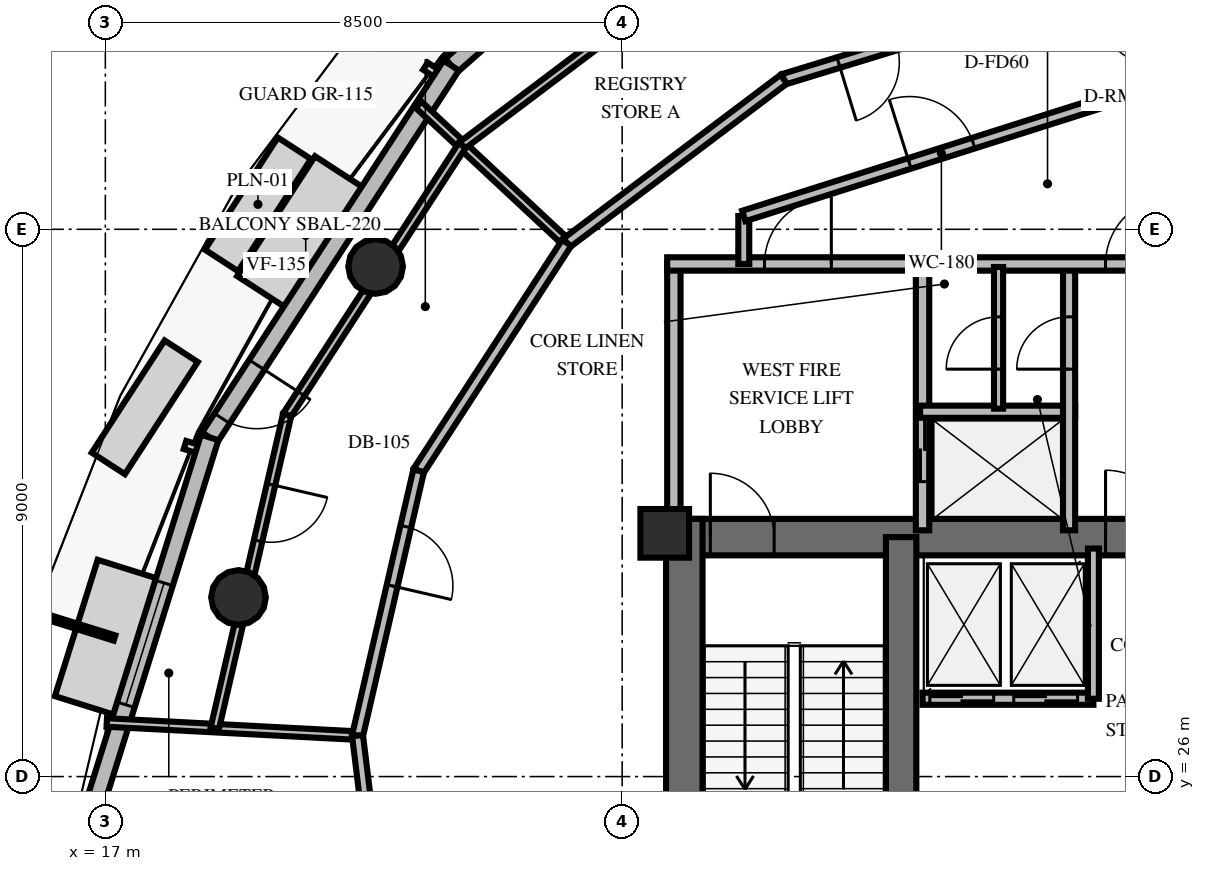
"""IFC4 building model, lengths in metres.
Left out: names, types, materials, properties, quantities, classifications, styles, units other than length and angle.
Written with IfcOpenShell. Run it as: python <this file> out.ifc"""

import sys

from ifc_helpers import new_model, si_unit, direction, frame, frame_2d, origin, origin_2d, place, context, subcontext, project, spatial, rectangle, circle, extrude, element, fill, save


model = new_model("IFC4")
c1 = context("Model", 3, precision=1e-05, world=origin(), true_north=direction((0.0, 1.0)))
c2 = subcontext(c1, "Body", "Model", "MODEL_VIEW")
j1 = project(units=[si_unit("LENGTHUNIT", "METRE"), si_unit("PLANEANGLEUNIT", "RADIAN")], contexts=[c1])
p1 = place(None, origin())
s1 = spatial("IfcSite", under=j1, at=p1, CompositionType="ELEMENT")
p2 = place(p1, origin())
s2 = spatial("IfcBuilding", under=s1, at=p2, CompositionType="ELEMENT")
p3 = place(p2, frame((0.0, 0.0, 266.4)))
s3 = spatial("IfcBuildingStorey", under=s2, at=p3, CompositionType="ELEMENT", Elevation=266.4)
p4 = place(p3, frame((26.222, 29.938, 0.0), z_axis=(0.0, 0.0, 1.0), x_axis=(1.0, 0.0, 0.0)))
e1 = element("IfcWall", 1, at=p4, inside=s3, PredefinedType="SHEAR", context=c2, shape_type="SweptSolid", body=[
    extrude(rectangle(XDim=15.566, YDim=0.6, at=frame_2d((7.783, 0.0))), origin(), (0.0, 0.0, 1.0), 3.6),
])
p5 = place(p4, frame((0.728, 0.0, 0.0)))
e2 = element("IfcOpeningElement", 2, at=p5, cuts=e1, PredefinedType="OPENING", context=c2, shape_type="SweptSolid", body=[
    extrude(rectangle(XDim=1.05, YDim=2.15, at=frame_2d((0.525, 1.075))), frame((0.0, 0.31, 0.0), z_axis=(0.0, -1.0, 0.0), x_axis=(1.0, 0.0, 0.0)), (0.0, 0.0, 1.0), 0.62),
])
p6 = place(p4, frame((13.778, 0.0, 0.0)))
e3 = element("IfcOpeningElement", 3, at=p6, cuts=e1, PredefinedType="OPENING", context=c2, shape_type="SweptSolid", body=[
    extrude(rectangle(XDim=1.05, YDim=2.15, at=frame_2d((0.525, 1.075))), frame((0.0, 0.31, 0.0), z_axis=(0.0, -1.0, 0.0), x_axis=(1.0, 0.0, 0.0)), (0.0, 0.0, 1.0), 0.62),
])
p7 = place(p4, frame((7.228, 0.0, 0.0)))
e4 = element("IfcOpeningElement", 4, at=p7, cuts=e1, PredefinedType="OPENING", context=c2, shape_type="SweptSolid", body=[
    extrude(rectangle(XDim=1.1, YDim=2.15, at=frame_2d((0.55, 1.075))), frame((0.0, 0.31, 0.0), z_axis=(0.0, -1.0, 0.0), x_axis=(1.0, 0.0, 0.0)), (0.0, 0.0, 1.0), 0.62),
])
p8 = place(p3, frame((26.522, 19.962, 0.0), z_axis=(0.0, 0.0, 1.0), x_axis=(0.0, 1.0, 0.0)))
e5 = element("IfcWall", 5, at=p8, inside=s3, PredefinedType="SHEAR", context=c2, shape_type="SweptSolid", body=[
    extrude(rectangle(XDim=10.276, YDim=0.6, at=frame_2d((5.138, 0.0))), origin(), (0.0, 0.0, 1.0), 3.6),
])
p9 = place(p3, frame((30.088, 20.262, 0.0), z_axis=(0.0, 0.0, 1.0), x_axis=(0.0, 1.0, 0.0)))
e6 = element("IfcWall", 6, at=p9, inside=s3, PredefinedType="SHEAR", context=c2, shape_type="SweptSolid", body=[
    extrude(rectangle(XDim=9.676, YDim=0.5, at=frame_2d((4.838, 0.0))), origin(), (0.0, 0.0, 1.0), 3.6),
])
p10 = place(p3, frame((26.2, 30.0, 0.0), z_axis=(0.0, 0.0, 1.0), x_axis=(1.0, 0.0, 0.0)))
e7 = element("IfcColumn", 7, at=p10, inside=s3, PredefinedType="PILASTER", context=c2, shape_type="SweptSolid", body=[
    extrude(rectangle(XDim=0.8, YDim=0.8, at=origin_2d()), origin(), (0.0, 0.0, 1.0), 3.6),
])
for number, where, z_axis, x_axis in (
    (8, (21.445, 34.389, 0.0), (0.0, 0.0, 1.0), (1.0, 0.0, 0.0)),
    (9, (19.19, 28.946, 0.0), (0.0, 0.0, 1.0), (1.0, 0.0, 0.0)),
):
    element("IfcColumn", number, at=place(p3, frame(where, z_axis=z_axis, x_axis=x_axis)), inside=s3, PredefinedType="COLUMN", context=c2, shape_type="SweptSolid", body=[
        extrude(circle(Radius=0.45, at=origin_2d()), origin(), (0.0, 0.0, 1.0), 3.6),
    ])
p11 = place(p3, frame((28.025, 42.4, 0.0), z_axis=(0.0, 0.0, 1.0), x_axis=(-0.750016069433, -0.661419606295, 0.0)))
e10 = element("IfcWall", 10, at=p11, inside=s3, PredefinedType="SOLIDWALL", context=c2, shape_type="SweptSolid", body=[
    extrude(rectangle(XDim=7.115, YDim=0.3, at=frame_2d((3.558, 0.0))), origin(), (0.0, 0.0, 1.0), 2.76),
])
p12 = place(p11, frame((2.508, 0.0, 0.8)))
e11 = element("IfcOpeningElement", 11, at=p12, cuts=e10, PredefinedType="OPENING", context=c2, shape_type="SweptSolid", body=[
    extrude(rectangle(XDim=2.1, YDim=1.85, at=frame_2d((1.05, 0.925))), frame((0.0, 0.16, 0.0), z_axis=(0.0, -1.0, 0.0), x_axis=(1.0, 0.0, 0.0)), (0.0, 0.0, 1.0), 0.32),
])
p13 = place(p3, frame((22.689, 37.694, 0.0), z_axis=(0.0, 0.0, 1.0), x_axis=(-0.544632964152, -0.838674510379, 0.0)))
e12 = element("IfcWall", 12, at=p13, inside=s3, PredefinedType="SOLIDWALL", context=c2, shape_type="SweptSolid", body=[
    extrude(rectangle(XDim=7.293, YDim=0.3, at=frame_2d((3.646, 0.0))), origin(), (0.0, 0.0, 1.0), 2.76),
])
p14 = place(p13, frame((5.87, 0.0, 0.0)))
e13 = element("IfcOpeningElement", 13, at=p14, cuts=e12, PredefinedType="OPENING", context=c2, shape_type="SweptSolid", body=[
    extrude(rectangle(XDim=1.05, YDim=2.15, at=frame_2d((0.525, 1.075))), frame((0.0, 0.16, 0.0), z_axis=(0.0, -1.0, 0.0), x_axis=(1.0, 0.0, 0.0)), (0.0, 0.0, 1.0), 0.32),
])
p15 = place(p3, frame((18.717, 31.577, 0.0), z_axis=(0.0, 0.0, 1.0), x_axis=(-0.299202870459, -0.954189521169, 0.0)))
e14 = element("IfcWall", 14, at=p15, inside=s3, PredefinedType="SOLIDWALL", context=c2, shape_type="SweptSolid", body=[
    extrude(rectangle(XDim=7.115, YDim=0.3, at=frame_2d((3.558, 0.0))), origin(), (0.0, 0.0, 1.0), 2.76),
])
p16 = place(p15, frame((2.508, 0.0, 0.8)))
e15 = element("IfcOpeningElement", 15, at=p16, cuts=e14, PredefinedType="OPENING", context=c2, shape_type="SweptSolid", body=[
    extrude(rectangle(XDim=2.1, YDim=1.85, at=frame_2d((1.05, 0.925))), frame((0.0, 0.16, 0.0), z_axis=(0.0, -1.0, 0.0), x_axis=(1.0, 0.0, 0.0)), (0.0, 0.0, 1.0), 0.32),
])
p17 = place(p3, frame((26.35, 30.05, 0.0), z_axis=(0.0, 0.0, 1.0), x_axis=(0.0, 1.0, 0.0)))
e16 = element("IfcWall", 16, at=p17, inside=s3, PredefinedType="SOLIDWALL", context=c2, shape_type="SweptSolid", body=[
    extrude(rectangle(XDim=4.38, YDim=0.22, at=frame_2d((2.19, 0.0))), origin(), (0.0, 0.0, 1.0), 2.46),
])
p18 = place(p3, frame((30.44, 30.05, 0.0), z_axis=(0.0, 0.0, 1.0), x_axis=(0.0, 1.0, 0.0)))
e17 = element("IfcWall", 17, at=p18, inside=s3, PredefinedType="SOLIDWALL", context=c2, shape_type="SweptSolid", body=[
    extrude(rectangle(XDim=4.38, YDim=0.22, at=frame_2d((2.19, 0.0))), origin(), (0.0, 0.0, 1.0), 2.46),
])
p19 = place(p18, frame((0.8, 0.0, 0.0)))
e18 = element("IfcOpeningElement", 18, at=p19, cuts=e17, PredefinedType="OPENING", context=c2, shape_type="SweptSolid", body=[
    extrude(rectangle(XDim=1.05, YDim=2.1, at=frame_2d((0.525, 1.05))), frame((0.0, 0.12, 0.0), z_axis=(0.0, -1.0, 0.0), x_axis=(1.0, 0.0, 0.0)), (0.0, 0.0, 1.0), 0.24),
])
p20 = place(p3, frame((26.24, 34.43, 0.0), z_axis=(0.0, 0.0, 1.0), x_axis=(1.0, 0.0, 0.0)))
e19 = element("IfcWall", 19, at=p20, inside=s3, PredefinedType="SOLIDWALL", context=c2, shape_type="SweptSolid", body=[
    extrude(rectangle(XDim=4.31, YDim=0.22, at=frame_2d((2.155, 0.0))), origin(), (0.0, 0.0, 1.0), 2.46),
])
p21 = place(p20, frame((1.6, 0.0, 0.0)))
e20 = element("IfcOpeningElement", 20, at=p21, cuts=e19, PredefinedType="OPENING", context=c2, shape_type="SweptSolid", body=[
    extrude(rectangle(XDim=1.1, YDim=2.15, at=frame_2d((0.55, 1.075))), frame((0.0, 0.12, 0.0), z_axis=(0.0, -1.0, 0.0), x_axis=(1.0, 0.0, 0.0)), (0.0, 0.0, 1.0), 0.24),
])
p22 = place(p3, frame((30.4, 32.0, 0.0), z_axis=(0.0, 0.0, 1.0), x_axis=(1.0, 0.0, 0.0)))
e21 = element("IfcWall", 21, at=p22, inside=s3, PredefinedType="SOLIDWALL", context=c2, shape_type="SweptSolid", body=[
    extrude(rectangle(XDim=2.55, YDim=0.2, at=frame_2d((1.275, 0.0))), origin(), (0.0, 0.0, 1.0), 2.46),
])
p23 = place(p3, frame((32.85, 30.05, 0.0), z_axis=(0.0, 0.0, 1.0), x_axis=(0.0, 1.0, 0.0)))
e22 = element("IfcWall", 22, at=p23, inside=s3, PredefinedType="SOLIDWALL", context=c2, shape_type="SweptSolid", body=[
    extrude(rectangle(XDim=4.38, YDim=0.2, at=frame_2d((2.19, 0.0))), origin(), (0.0, 0.0, 1.0), 2.46),
])
p24 = place(p23, frame((2.65, 0.0, 0.0)))
e23 = element("IfcOpeningElement", 23, at=p24, cuts=e22, PredefinedType="OPENING", context=c2, shape_type="SweptSolid", body=[
    extrude(rectangle(XDim=0.86, YDim=2.05, at=frame_2d((0.43, 1.025))), frame((0.0, 0.11, 0.0), z_axis=(0.0, -1.0, 0.0), x_axis=(1.0, 0.0, 0.0)), (0.0, 0.0, 1.0), 0.22),
])
p25 = place(p3, frame((30.44, 34.43, 0.0), z_axis=(0.0, 0.0, 1.0), x_axis=(1.0, 0.0, 0.0)))
e24 = element("IfcWall", 24, at=p25, inside=s3, PredefinedType="SOLIDWALL", context=c2, shape_type="SweptSolid", body=[
    extrude(rectangle(XDim=7.12, YDim=0.22, at=frame_2d((3.56, 0.0))), origin(), (0.0, 0.0, 1.0), 2.46),
])
p26 = place(p25, frame((3.01, 0.0, 0.0)))
e25 = element("IfcOpeningElement", 25, at=p26, cuts=e24, PredefinedType="OPENING", context=c2, shape_type="SweptSolid", body=[
    extrude(rectangle(XDim=1.1, YDim=2.15, at=frame_2d((0.55, 1.075))), frame((0.0, 0.12, 0.0), z_axis=(0.0, -1.0, 0.0), x_axis=(1.0, 0.0, 0.0)), (0.0, 0.0, 1.0), 0.24),
])
p27 = place(p3, frame((31.69, 32.05, 0.0), z_axis=(0.0, 0.0, 1.0), x_axis=(0.0, 1.0, 0.0)))
e26 = element("IfcWall", 26, at=p27, inside=s3, PredefinedType="PARTITIONING", context=c2, shape_type="SweptSolid", body=[
    extrude(rectangle(XDim=2.33, YDim=0.15, at=frame_2d((1.165, 0.0))), origin(), (0.0, 0.0, 1.0), 2.46),
])
p28 = place(p27, frame((0.65, 0.0, 0.0)))
e27 = element("IfcOpeningElement", 27, at=p28, cuts=e26, PredefinedType="OPENING", context=c2, shape_type="SweptSolid", body=[
    extrude(rectangle(XDim=0.86, YDim=2.05, at=frame_2d((0.43, 1.025))), frame((0.0, 0.085, 0.0), z_axis=(0.0, -1.0, 0.0), x_axis=(1.0, 0.0, 0.0)), (0.0, 0.0, 1.0), 0.17),
])
p29 = place(p3, frame((30.44, 27.28, 0.0), z_axis=(0.0, 0.0, 1.0), x_axis=(1.0, 0.0, 0.0)))
e28 = element("IfcWall", 28, at=p29, inside=s3, PredefinedType="SOLIDWALL", context=c2, shape_type="SweptSolid", body=[
    extrude(rectangle(XDim=2.81, YDim=0.2, at=frame_2d((1.405, 0.0))), origin(), (0.0, 0.0, 1.0), 2.46),
])
p30 = place(p29, frame((0.12, 0.0, 0.0)))
e29 = element("IfcOpeningElement", 29, at=p30, cuts=e28, PredefinedType="OPENING", context=c2, shape_type="SweptSolid", body=[
    extrude(rectangle(XDim=1.05, YDim=2.1, at=frame_2d((0.525, 1.05))), frame((0.0, 0.11, 0.0), z_axis=(0.0, -1.0, 0.0), x_axis=(1.0, 0.0, 0.0)), (0.0, 0.0, 1.0), 0.22),
])
p31 = place(p29, frame((1.5, 0.0, 0.0)))
e30 = element("IfcOpeningElement", 30, at=p31, cuts=e28, PredefinedType="OPENING", context=c2, shape_type="SweptSolid", body=[
    extrude(rectangle(XDim=1.05, YDim=2.1, at=frame_2d((0.525, 1.05))), frame((0.0, 0.11, 0.0), z_axis=(0.0, -1.0, 0.0), x_axis=(1.0, 0.0, 0.0)), (0.0, 0.0, 1.0), 0.22),
])
p32 = place(p3, frame((33.25, 27.28, 0.0), z_axis=(0.0, 0.0, 1.0), x_axis=(0.0, 1.0, 0.0)))
e31 = element("IfcWall", 31, at=p32, inside=s3, PredefinedType="SOLIDWALL", context=c2, shape_type="SweptSolid", body=[
    extrude(rectangle(XDim=2.47, YDim=0.18, at=frame_2d((1.235, 0.0))), origin(), (0.0, 0.0, 1.0), 2.46),
])
p33 = place(p3, frame((27.5, 34.43, 0.0), z_axis=(0.0, 0.0, 1.0), x_axis=(0.0, 1.0, 0.0)))
e32 = element("IfcWall", 32, at=p33, inside=s3, PredefinedType="PARTITIONING", context=c2, shape_type="SweptSolid", body=[
    extrude(rectangle(XDim=0.789, YDim=0.18, at=frame_2d((0.395, 0.0))), origin(), (0.0, 0.0, 1.0), 2.46),
])
p34 = place(p3, frame((27.5, 35.219, 0.0), z_axis=(0.0, 0.0, 1.0), x_axis=(0.953228121756, 0.302251795518, 0.0)))
e33 = element("IfcWall", 33, at=p34, inside=s3, PredefinedType="PARTITIONING", context=c2, shape_type="SweptSolid", body=[
    extrude(rectangle(XDim=6.819, YDim=0.18, at=frame_2d((3.409, 0.0))), origin(), (0.0, 0.0, 1.0), 2.46),
])
p35 = place(p34, frame((2.86, 0.0, 0.0)))
e34 = element("IfcOpeningElement", 34, at=p35, cuts=e33, PredefinedType="OPENING", context=c2, shape_type="SweptSolid", body=[
    extrude(rectangle(XDim=1.1, YDim=2.15, at=frame_2d((0.55, 1.075))), frame((0.0, 0.1, 0.0), z_axis=(0.0, -1.0, 0.0), x_axis=(1.0, 0.0, 0.0)), (0.0, 0.0, 1.0), 0.2),
])
p36 = place(p3, frame((24.587, 34.777, 0.0), z_axis=(0.0, 0.0, 1.0), x_axis=(-0.731340377031, 0.682012648654, 0.0)))
e35 = element("IfcWall", 35, at=p36, inside=s3, PredefinedType="PARTITIONING", context=c2, shape_type="SweptSolid", body=[
    extrude(rectangle(XDim=3.331, YDim=0.14, at=frame_2d((1.666, 0.0))), origin(), (0.0, 0.0, 1.0), 2.46),
])
p37 = place(p3, frame((32.431, 38.774, 0.0), z_axis=(0.0, 0.0, 1.0), x_axis=(-0.956300674808, -0.292385053247, 0.0)))
e36 = element("IfcWall", 36, at=p37, inside=s3, PredefinedType="PARTITIONING", context=c2, shape_type="SweptSolid", body=[
    extrude(rectangle(XDim=4.47, YDim=0.18, at=frame_2d((2.235, 0.0))), origin(), (0.0, 0.0, 1.0), 2.46),
])
p38 = place(p37, frame((2.527, 0.0, 0.0)))
e37 = element("IfcOpeningElement", 37, at=p38, cuts=e36, PredefinedType="OPENING", context=c2, shape_type="SweptSolid", body=[
    extrude(rectangle(XDim=1.0, YDim=2.15, at=frame_2d((0.5, 1.075))), frame((0.0, 0.1, 0.0), z_axis=(0.0, -1.0, 0.0), x_axis=(1.0, 0.0, 0.0)), (0.0, 0.0, 1.0), 0.2),
])
p39 = place(p3, frame((28.157, 37.467, 0.0), z_axis=(0.0, 0.0, 1.0), x_axis=(-0.798627995496, -0.601824995169, 0.0)))
e38 = element("IfcWall", 38, at=p39, inside=s3, PredefinedType="PARTITIONING", context=c2, shape_type="SweptSolid", body=[
    extrude(rectangle(XDim=4.47, YDim=0.18, at=frame_2d((2.235, 0.0))), origin(), (0.0, 0.0, 1.0), 2.46),
])
p40 = place(p3, frame((27.09, 39.561, 0.0), z_axis=(0.0, 0.0, 1.0), x_axis=(-0.798628918632, -0.601823770156, 0.0)))
e39 = element("IfcWall", 39, at=p40, inside=s3, PredefinedType="PARTITIONING", context=c2, shape_type="SweptSolid", body=[
    extrude(rectangle(XDim=5.286, YDim=0.14, at=frame_2d((2.643, 0.0))), origin(), (0.0, 0.0, 1.0), 2.46),
])
p41 = place(p3, frame((21.148, 26.674, 0.0), z_axis=(0.0, 0.0, 1.0), x_axis=(-0.998630537504, 0.052316819138, 0.0)))
e40 = element("IfcWall", 40, at=p41, inside=s3, PredefinedType="PARTITIONING", context=c2, shape_type="SweptSolid", body=[
    extrude(rectangle(XDim=4.13, YDim=0.14, at=frame_2d((2.065, 0.0))), origin(), (0.0, 0.0, 1.0), 2.46),
])
p42 = place(p3, frame((24.587, 34.777, 0.0), z_axis=(0.0, 0.0, 1.0), x_axis=(-0.544638874192, -0.838670672385, 0.0)))
e41 = element("IfcWall", 41, at=p42, inside=s3, PredefinedType="PARTITIONING", context=c2, shape_type="SweptSolid", body=[
    extrude(rectangle(XDim=4.47, YDim=0.18, at=frame_2d((2.235, 0.0))), origin(), (0.0, 0.0, 1.0), 2.46),
])
p43 = place(p3, frame((22.153, 31.029, 0.0), z_axis=(0.0, 0.0, 1.0), x_axis=(-0.224927321525, -0.974375543634, 0.0)))
e42 = element("IfcWall", 42, at=p43, inside=s3, PredefinedType="PARTITIONING", context=c2, shape_type="SweptSolid", body=[
    extrude(rectangle(XDim=4.47, YDim=0.18, at=frame_2d((2.235, 0.0))), origin(), (0.0, 0.0, 1.0), 2.46),
])
p44 = place(p43, frame((0.942, 0.0, 0.0)))
e43 = element("IfcOpeningElement", 43, at=p44, cuts=e42, PredefinedType="OPENING", context=c2, shape_type="SweptSolid", body=[
    extrude(rectangle(XDim=1.0, YDim=2.15, at=frame_2d((0.5, 1.075))), frame((0.0, 0.1, 0.0), z_axis=(0.0, -1.0, 0.0), x_axis=(1.0, 0.0, 0.0)), (0.0, 0.0, 1.0), 0.2),
])
p45 = place(p3, frame((22.869, 36.38, 0.0), z_axis=(0.0, 0.0, 1.0), x_axis=(-0.54466198204, -0.838655665527, 0.0)))
e44 = element("IfcWall", 44, at=p45, inside=s3, PredefinedType="PARTITIONING", context=c2, shape_type="SweptSolid", body=[
    extrude(rectangle(XDim=5.286, YDim=0.14, at=frame_2d((2.643, 0.0))), origin(), (0.0, 0.0, 1.0), 2.46),
])
p46 = place(p3, frame((19.99, 31.947, 0.0), z_axis=(0.0, 0.0, 1.0), x_axis=(-0.224977567686, -0.974363943318, 0.0)))
e45 = element("IfcWall", 45, at=p46, inside=s3, PredefinedType="PARTITIONING", context=c2, shape_type="SweptSolid", body=[
    extrude(rectangle(XDim=5.286, YDim=0.14, at=frame_2d((2.643, 0.0))), origin(), (0.0, 0.0, 1.0), 2.46),
])
p47 = place(p46, frame((1.174, 0.0, 0.0)))
e46 = element("IfcOpeningElement", 46, at=p47, cuts=e45, PredefinedType="OPENING", context=c2, shape_type="SweptSolid", body=[
    extrude(rectangle(XDim=0.95, YDim=2.15, at=frame_2d((0.475, 1.075))), frame((0.0, 0.08, 0.0), z_axis=(0.0, -1.0, 0.0), x_axis=(1.0, 0.0, 0.0)), (0.0, 0.0, 1.0), 0.16),
])
p48 = place(p3, frame((21.148, 26.674, 0.0), z_axis=(0.0, 0.0, 1.0), x_axis=(0.121862979882, -0.992546932963, 0.0)))
e47 = element("IfcWall", 47, at=p48, inside=s3, PredefinedType="PARTITIONING", context=c2, shape_type="SweptSolid", body=[
    extrude(rectangle(XDim=4.469, YDim=0.18, at=frame_2d((2.235, 0.0))), origin(), (0.0, 0.0, 1.0), 2.46),
])
p49 = place(p14, origin())
e48 = element("IfcDoor", 48, at=p49, inside=s3, OperationType="SINGLE_SWING_LEFT", PredefinedType="DOOR", context=c2, shape_type="SweptSolid", body=[
    extrude(rectangle(XDim=1.05, YDim=2.15, at=frame_2d((0.525, 1.075))), frame((0.0, 0.025, 0.0), z_axis=(0.0, -1.0, 0.0), x_axis=(1.0, 0.0, 0.0)), (0.0, 0.0, 1.0), 0.05),
])
fill(e13, e48)
p50 = place(p16, origin())
e49 = element("IfcWindow", 49, at=p50, inside=s3, PartitioningType="SINGLE_PANEL", PredefinedType="WINDOW", context=c2, shape_type="SweptSolid", body=[
    extrude(rectangle(XDim=2.1, YDim=1.85, at=frame_2d((1.05, 0.925))), frame((0.0, 0.03, 0.0), z_axis=(0.0, -1.0, 0.0), x_axis=(1.0, 0.0, 0.0)), (0.0, 0.0, 1.0), 0.06),
])
fill(e15, e49)
p51 = place(p5, origin())
e50 = element("IfcDoor", 50, at=p51, inside=s3, OperationType="SINGLE_SWING_LEFT", PredefinedType="DOOR", context=c2, shape_type="SweptSolid", body=[
    extrude(rectangle(XDim=1.05, YDim=2.15, at=frame_2d((0.525, 1.075))), frame((0.0, 0.025, 0.0), z_axis=(0.0, -1.0, 0.0), x_axis=(1.0, 0.0, 0.0)), (0.0, 0.0, 1.0), 0.05),
])
fill(e2, e50)
p52 = place(p7, origin())
e51 = element("IfcDoor", 51, at=p52, inside=s3, OperationType="SINGLE_SWING_LEFT", PredefinedType="DOOR", context=c2, shape_type="SweptSolid", body=[
    extrude(rectangle(XDim=1.1, YDim=2.15, at=frame_2d((0.55, 1.075))), frame((0.0, 0.025, 0.0), z_axis=(0.0, -1.0, 0.0), x_axis=(1.0, 0.0, 0.0)), (0.0, 0.0, 1.0), 0.05),
])
fill(e4, e51)
p53 = place(p21, origin())
e52 = element("IfcDoor", 52, at=p53, inside=s3, OperationType="SINGLE_SWING_RIGHT", PredefinedType="DOOR", context=c2, shape_type="SweptSolid", body=[
    extrude(rectangle(XDim=1.1, YDim=2.15, at=frame_2d((0.55, 1.075))), frame((0.0, 0.025, 0.0), z_axis=(0.0, -1.0, 0.0), x_axis=(1.0, 0.0, 0.0)), (0.0, 0.0, 1.0), 0.05),
])
fill(e20, e52)
p54 = place(p19, origin())
e53 = element("IfcDoor", 53, at=p54, inside=s3, OperationType="DOUBLE_DOOR_SLIDING", PredefinedType="USERDEFINED", context=c2, shape_type="SweptSolid", body=[
    extrude(rectangle(XDim=1.05, YDim=2.1, at=frame_2d((0.525, 1.05))), frame((0.0, 0.025, 0.0), z_axis=(0.0, -1.0, 0.0), x_axis=(1.0, 0.0, 0.0)), (0.0, 0.0, 1.0), 0.05),
])
fill(e18, e53)
p55 = place(p24, origin())
e54 = element("IfcDoor", 54, at=p55, inside=s3, OperationType="SINGLE_SWING_LEFT", PredefinedType="TRAPDOOR", context=c2, shape_type="SweptSolid", body=[
    extrude(rectangle(XDim=0.86, YDim=2.05, at=frame_2d((0.43, 1.025))), frame((0.0, 0.025, 0.0), z_axis=(0.0, -1.0, 0.0), x_axis=(1.0, 0.0, 0.0)), (0.0, 0.0, 1.0), 0.05),
])
fill(e23, e54)
p56 = place(p26, origin())
e55 = element("IfcDoor", 55, at=p56, inside=s3, OperationType="SINGLE_SWING_RIGHT", PredefinedType="DOOR", context=c2, shape_type="SweptSolid", body=[
    extrude(rectangle(XDim=1.1, YDim=2.15, at=frame_2d((0.55, 1.075))), frame((0.0, 0.025, 0.0), z_axis=(0.0, -1.0, 0.0), x_axis=(1.0, 0.0, 0.0)), (0.0, 0.0, 1.0), 0.05),
])
fill(e25, e55)
p57 = place(p28, origin())
e56 = element("IfcDoor", 56, at=p57, inside=s3, OperationType="SINGLE_SWING_LEFT", PredefinedType="TRAPDOOR", context=c2, shape_type="SweptSolid", body=[
    extrude(rectangle(XDim=0.86, YDim=2.05, at=frame_2d((0.43, 1.025))), frame((0.0, 0.025, 0.0), z_axis=(0.0, -1.0, 0.0), x_axis=(1.0, 0.0, 0.0)), (0.0, 0.0, 1.0), 0.05),
])
fill(e27, e56)
p58 = place(p30, origin())
e57 = element("IfcDoor", 57, at=p58, inside=s3, OperationType="DOUBLE_DOOR_SLIDING", PredefinedType="USERDEFINED", context=c2, shape_type="SweptSolid", body=[
    extrude(rectangle(XDim=1.05, YDim=2.1, at=frame_2d((0.525, 1.05))), frame((0.0, 0.025, 0.0), z_axis=(0.0, -1.0, 0.0), x_axis=(1.0, 0.0, 0.0)), (0.0, 0.0, 1.0), 0.05),
])
fill(e29, e57)
p59 = place(p31, origin())
e58 = element("IfcDoor", 58, at=p59, inside=s3, OperationType="DOUBLE_DOOR_SLIDING", PredefinedType="USERDEFINED", context=c2, shape_type="SweptSolid", body=[
    extrude(rectangle(XDim=1.05, YDim=2.1, at=frame_2d((0.525, 1.05))), frame((0.0, 0.025, 0.0), z_axis=(0.0, -1.0, 0.0), x_axis=(1.0, 0.0, 0.0)), (0.0, 0.0, 1.0), 0.05),
])
fill(e30, e58)
p60 = place(p35, origin())
e59 = element("IfcDoor", 59, at=p60, inside=s3, OperationType="SINGLE_SWING_LEFT", PredefinedType="DOOR", context=c2, shape_type="SweptSolid", body=[
    extrude(rectangle(XDim=1.1, YDim=2.15, at=frame_2d((0.55, 1.075))), frame((0.0, 0.025, 0.0), z_axis=(0.0, -1.0, 0.0), x_axis=(1.0, 0.0, 0.0)), (0.0, 0.0, 1.0), 0.05),
])
fill(e34, e59)
p61 = place(p38, origin())
e60 = element("IfcDoor", 60, at=p61, inside=s3, OperationType="SINGLE_SWING_RIGHT", PredefinedType="DOOR", context=c2, shape_type="SweptSolid", body=[
    extrude(rectangle(XDim=1.0, YDim=2.15, at=frame_2d((0.5, 1.075))), frame((0.0, 0.025, 0.0), z_axis=(0.0, -1.0, 0.0), x_axis=(1.0, 0.0, 0.0)), (0.0, 0.0, 1.0), 0.05),
])
fill(e37, e60)
p62 = place(p44, origin())
e61 = element("IfcDoor", 61, at=p62, inside=s3, OperationType="SINGLE_SWING_RIGHT", PredefinedType="DOOR", context=c2, shape_type="SweptSolid", body=[
    extrude(rectangle(XDim=1.0, YDim=2.15, at=frame_2d((0.5, 1.075))), frame((0.0, 0.025, 0.0), z_axis=(0.0, -1.0, 0.0), x_axis=(1.0, 0.0, 0.0)), (0.0, 0.0, 1.0), 0.05),
])
fill(e43, e61)
p63 = place(p47, origin())
e62 = element("IfcDoor", 62, at=p63, inside=s3, OperationType="SINGLE_SWING_LEFT", PredefinedType="DOOR", context=c2, shape_type="SweptSolid", body=[
    extrude(rectangle(XDim=0.95, YDim=2.15, at=frame_2d((0.475, 1.075))), frame((0.0, 0.025, 0.0), z_axis=(0.0, -1.0, 0.0), x_axis=(1.0, 0.0, 0.0)), (0.0, 0.0, 1.0), 0.05),
])
fill(e46, e62)
save(model, sys.argv[1])
